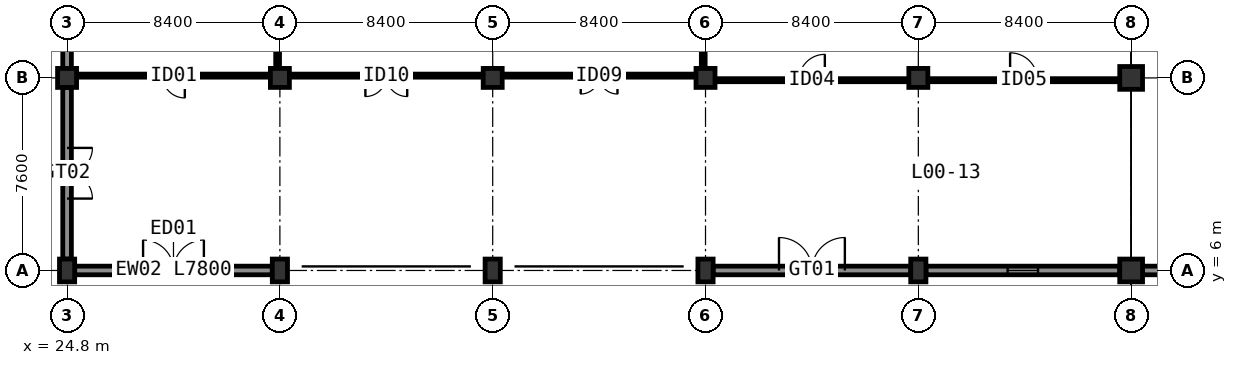
"""IFC4 building model, lengths in metres.
Left out: names, types, materials, properties, quantities, classifications, styles, units other than length and angle.
Written with IfcOpenShell. Run it as: python <this file> out.ifc"""

import sys

from ifc_helpers import new_model, si_unit, direction, frame, frame_2d, origin, origin_2d, place, context, subcontext, project, spatial, rectangle, extrude, element, fill, save


model = new_model("IFC4")
c1 = context("Model", 3, precision=1e-05, world=origin(), true_north=direction((0.0, 1.0)))
c2 = subcontext(c1, "Body", "Model", "MODEL_VIEW")
j1 = project(units=[si_unit("LENGTHUNIT", "METRE"), si_unit("PLANEANGLEUNIT", "RADIAN")], contexts=[c1])
p1 = place(None, origin())
s1 = spatial("IfcSite", under=j1, at=p1, CompositionType="ELEMENT")
p2 = place(p1, origin())
s2 = spatial("IfcBuilding", under=s1, at=p2, CompositionType="ELEMENT")
p3 = place(p2, origin())
s3 = spatial("IfcBuildingStorey", under=s2, at=p3, CompositionType="ELEMENT", Elevation=0.0)
for number, where, z_axis, x_axis in (
    (1, (24.8, 6.0, 0.0), (0.0, 0.0, 1.0), (1.0, 0.0, 0.0)),
    (2, (33.2, 6.0, 0.0), (0.0, 0.0, 1.0), (1.0, 0.0, 0.0)),
    (3, (41.6, 6.0, 0.0), (0.0, 0.0, 1.0), (1.0, 0.0, 0.0)),
    (4, (50.0, 6.0, 0.0), (0.0, 0.0, 1.0), (1.0, 0.0, 0.0)),
    (5, (58.4, 6.0, 0.0), (0.0, 0.0, 1.0), (1.0, 0.0, 0.0)),
):
    element("IfcColumn", number, at=place(p3, frame(where, z_axis=z_axis, x_axis=x_axis)), inside=s3, PredefinedType="PILASTER", context=c2, shape_type="SweptSolid", body=[
        extrude(rectangle(XDim=0.6, YDim=0.9, at=origin_2d()), origin(), (0.0, 0.0, 1.0), 4.8),
    ])
p4 = place(p3, frame((66.8, 6.0, 0.0), z_axis=(0.0, 0.0, 1.0), x_axis=(1.0, 0.0, 0.0)))
e6 = element("IfcColumn", 6, at=p4, inside=s3, PredefinedType="COLUMN", context=c2, shape_type="SweptSolid", body=[
    extrude(rectangle(XDim=0.9, YDim=0.9, at=origin_2d()), origin(), (0.0, 0.0, 1.0), 4.8),
])
for number, where, z_axis, x_axis in (
    (7, (24.8, 13.6, 0.0), (0.0, 0.0, 1.0), (1.0, 0.0, 0.0)),
    (8, (33.2, 13.6, 0.0), (0.0, 0.0, 1.0), (1.0, 0.0, 0.0)),
    (9, (41.6, 13.6, 0.0), (0.0, 0.0, 1.0), (1.0, 0.0, 0.0)),
    (10, (50.0, 13.6, 0.0), (0.0, 0.0, 1.0), (1.0, 0.0, 0.0)),
    (11, (58.4, 13.6, 0.0), (0.0, 0.0, 1.0), (1.0, 0.0, 0.0)),
):
    element("IfcColumn", number, at=place(p3, frame(where, z_axis=z_axis, x_axis=x_axis)), inside=s3, PredefinedType="COLUMN", context=c2, shape_type="SweptSolid", body=[
        extrude(rectangle(XDim=0.75, YDim=0.75, at=origin_2d()), origin(), (0.0, 0.0, 1.0), 4.8),
    ])
p5 = place(p3, frame((66.8, 13.6, 0.0), z_axis=(0.0, 0.0, 1.0), x_axis=(1.0, 0.0, 0.0)))
e12 = element("IfcColumn", 12, at=p5, inside=s3, PredefinedType="COLUMN", context=c2, shape_type="SweptSolid", body=[
    extrude(rectangle(XDim=0.9, YDim=0.9, at=origin_2d()), origin(), (0.0, 0.0, 1.0), 4.8),
])
p6 = place(p3, frame((25.1, 6.0, 0.0), z_axis=(0.0, 0.0, 1.0), x_axis=(1.0, 0.0, 0.0)))
e13 = element("IfcWall", 13, at=p6, inside=s3, PredefinedType="SOLIDWALL", context=c2, shape_type="SweptSolid", body=[
    extrude(rectangle(XDim=7.8, YDim=0.34, at=frame_2d((3.9, 0.0))), origin(), (0.0, 0.0, 1.0), 2.947),
])
p7 = place(p6, frame((2.7, 0.0, 0.0)))
e14 = element("IfcOpeningElement", 14, at=p7, cuts=e13, PredefinedType="OPENING", context=c2, shape_type="SweptSolid", body=[
    extrude(rectangle(XDim=2.4, YDim=2.4, at=frame_2d((1.2, 1.2))), frame((0.0, 0.18, 0.0), z_axis=(0.0, -1.0, 0.0), x_axis=(1.0, 0.0, 0.0)), (0.0, 0.0, 1.0), 0.36),
])
p8 = place(p3, frame((50.3, 6.0, 0.0), z_axis=(0.0, 0.0, 1.0), x_axis=(1.0, 0.0, 0.0)))
e15 = element("IfcWall", 15, at=p8, inside=s3, PredefinedType="SOLIDWALL", context=c2, shape_type="SweptSolid", body=[
    extrude(rectangle(XDim=7.8, YDim=0.34, at=frame_2d((3.9, 0.0))), origin(), (0.0, 0.0, 1.0), 2.947),
])
p9 = place(p8, frame((2.6, 0.0, 0.0)))
e16 = element("IfcOpeningElement", 16, at=p9, cuts=e15, PredefinedType="OPENING", context=c2, shape_type="SweptSolid", body=[
    extrude(rectangle(XDim=2.6, YDim=2.2, at=frame_2d((1.3, 1.1))), frame((0.0, 0.18, 0.0), z_axis=(0.0, -1.0, 0.0), x_axis=(1.0, 0.0, 0.0)), (0.0, 0.0, 1.0), 0.36),
])
p10 = place(p3, frame((58.7, 6.0, 0.0), z_axis=(0.0, 0.0, 1.0), x_axis=(1.0, 0.0, 0.0)))
e17 = element("IfcWall", 17, at=p10, inside=s3, PredefinedType="SOLIDWALL", context=c2, shape_type="SweptSolid", body=[
    extrude(rectangle(XDim=7.65, YDim=0.34, at=frame_2d((3.825, 0.0))), origin(), (0.0, 0.0, 1.0), 4.047),
])
p11 = place(p10, frame((3.225, 0.0, 0.95)))
e18 = element("IfcOpeningElement", 18, at=p11, cuts=e17, PredefinedType="OPENING", context=c2, shape_type="SweptSolid", body=[
    extrude(rectangle(XDim=1.2, YDim=1.5, at=frame_2d((0.6, 0.75))), frame((0.0, 0.18, 0.0), z_axis=(0.0, -1.0, 0.0), x_axis=(1.0, 0.0, 0.0)), (0.0, 0.0, 1.0), 0.36),
])
p12 = place(p3, frame((67.25, 6.0, 0.0), z_axis=(0.0, 0.0, 1.0), x_axis=(1.0, 0.0, 0.0)))
e19 = element("IfcWall", 19, at=p12, inside=s3, PredefinedType="SOLIDWALL", context=c2, shape_type="SweptSolid", body=[
    extrude(rectangle(XDim=7.95, YDim=0.34, at=frame_2d((3.975, 0.0))), origin(), (0.0, 0.0, 1.0), 4.5),
])
p13 = place(p12, frame((2.875, 0.0, 0.0)))
e20 = element("IfcOpeningElement", 20, at=p13, cuts=e19, PredefinedType="OPENING", context=c2, shape_type="SweptSolid", body=[
    extrude(rectangle(XDim=2.2, YDim=2.4, at=frame_2d((1.1, 1.2))), frame((0.0, 0.18, 0.0), z_axis=(0.0, -1.0, 0.0), x_axis=(1.0, 0.0, 0.0)), (0.0, 0.0, 1.0), 0.36),
])
p14 = place(p3, frame((24.8, 20.825, 0.0), z_axis=(0.0, 0.0, 1.0), x_axis=(0.0, -1.0, 0.0)))
e21 = element("IfcWall", 21, at=p14, inside=s3, PredefinedType="SOLIDWALL", context=c2, shape_type="SweptSolid", body=[
    extrude(rectangle(XDim=6.85, YDim=0.34, at=frame_2d((3.425, 0.0))), origin(), (0.0, 0.0, 1.0), 4.5),
])
p15 = place(p14, frame((2.225, 0.0, 0.0)))
e22 = element("IfcOpeningElement", 22, at=p15, cuts=e21, PredefinedType="OPENING", context=c2, shape_type="SweptSolid", body=[
    extrude(rectangle(XDim=2.4, YDim=2.4, at=frame_2d((1.2, 1.2))), frame((0.0, 0.18, 0.0), z_axis=(0.0, -1.0, 0.0), x_axis=(1.0, 0.0, 0.0)), (0.0, 0.0, 1.0), 0.36),
])
p16 = place(p3, frame((24.8, 13.225, 0.0), z_axis=(0.0, 0.0, 1.0), x_axis=(0.0, -1.0, 0.0)))
e23 = element("IfcWall", 23, at=p16, inside=s3, PredefinedType="SOLIDWALL", context=c2, shape_type="SweptSolid", body=[
    extrude(rectangle(XDim=6.775, YDim=0.34, at=frame_2d((3.388, 0.0))), origin(), (0.0, 0.0, 1.0), 4.5),
])
p17 = place(p16, frame((2.387, 0.0, 0.0)))
e24 = element("IfcOpeningElement", 24, at=p17, cuts=e23, PredefinedType="OPENING", context=c2, shape_type="SweptSolid", body=[
    extrude(rectangle(XDim=2.0, YDim=2.1, at=frame_2d((1.0, 1.05))), frame((0.0, 0.18, 0.0), z_axis=(0.0, -1.0, 0.0), x_axis=(1.0, 0.0, 0.0)), (0.0, 0.0, 1.0), 0.36),
])
p18 = place(p3, frame((33.11, 20.735, 0.0), z_axis=(0.0, 0.0, 1.0), x_axis=(0.0, -1.0, 0.0)))
e25 = element("IfcWall", 25, at=p18, inside=s3, PredefinedType="PARTITIONING", context=c2, shape_type="SweptSolid", body=[
    extrude(rectangle(XDim=6.67, YDim=0.15, at=frame_2d((3.335, 0.0))), origin(), (0.0, 0.0, 1.0), 3.81),
])
p19 = place(p18, frame((2.46, 0.0, 0.0)))
e26 = element("IfcOpeningElement", 26, at=p19, cuts=e25, PredefinedType="OPENING", context=c2, shape_type="SweptSolid", body=[
    extrude(rectangle(XDim=1.75, YDim=2.22, at=frame_2d((0.875, 1.11))), frame((0.0, 0.085, 0.0), z_axis=(0.0, -1.0, 0.0), x_axis=(1.0, 0.0, 0.0)), (0.0, 0.0, 1.0), 0.17),
])
p20 = place(p3, frame((32.735, 13.69, 0.0), z_axis=(0.0, 0.0, 1.0), x_axis=(-1.0, 0.0, 0.0)))
e27 = element("IfcWall", 27, at=p20, inside=s3, PredefinedType="PARTITIONING", context=c2, shape_type="SweptSolid", body=[
    extrude(rectangle(XDim=7.455, YDim=0.12, at=frame_2d((3.728, 0.0))), origin(), (0.0, 0.0, 1.0), 4.5),
])
p21 = place(p20, frame((3.288, 0.0, 0.0)))
e28 = element("IfcOpeningElement", 28, at=p21, cuts=e27, PredefinedType="OPENING", context=c2, shape_type="SweptSolid", body=[
    extrude(rectangle(XDim=0.88, YDim=2.08, at=frame_2d((0.44, 1.04))), frame((0.0, 0.07, 0.0), z_axis=(0.0, -1.0, 0.0), x_axis=(1.0, 0.0, 0.0)), (0.0, 0.0, 1.0), 0.14),
])
p22 = place(p3, frame((49.91, 20.735, 0.0), z_axis=(0.0, 0.0, 1.0), x_axis=(0.0, -1.0, 0.0)))
e29 = element("IfcWall", 29, at=p22, inside=s3, PredefinedType="PARTITIONING", context=c2, shape_type="SweptSolid", body=[
    extrude(rectangle(XDim=6.67, YDim=0.15, at=frame_2d((3.335, 0.0))), origin(), (0.0, 0.0, 1.0), 4.5),
])
p23 = place(p22, frame((4.675, 0.0, 0.0)))
e30 = element("IfcOpeningElement", 30, at=p23, cuts=e29, PredefinedType="OPENING", context=c2, shape_type="SweptSolid", body=[
    extrude(rectangle(XDim=0.92, YDim=2.08, at=frame_2d((0.46, 1.04))), frame((0.0, 0.085, 0.0), z_axis=(0.0, -1.0, 0.0), x_axis=(1.0, 0.0, 0.0)), (0.0, 0.0, 1.0), 0.17),
])
p24 = place(p3, frame((50.465, 13.51, 0.0), z_axis=(0.0, 0.0, 1.0), x_axis=(1.0, 0.0, 0.0)))
e31 = element("IfcWall", 31, at=p24, inside=s3, PredefinedType="PARTITIONING", context=c2, shape_type="SweptSolid", body=[
    extrude(rectangle(XDim=7.47, YDim=0.12, at=frame_2d((3.735, 0.0))), origin(), (0.0, 0.0, 1.0), 3.81),
])
p25 = place(p24, frame((3.225, 0.0, 0.0)))
e32 = element("IfcOpeningElement", 32, at=p25, cuts=e31, PredefinedType="OPENING", context=c2, shape_type="SweptSolid", body=[
    extrude(rectangle(XDim=1.02, YDim=2.12, at=frame_2d((0.51, 1.06))), frame((0.0, 0.07, 0.0), z_axis=(0.0, -1.0, 0.0), x_axis=(1.0, 0.0, 0.0)), (0.0, 0.0, 1.0), 0.14),
])
p26 = place(p3, frame((58.865, 13.51, 0.0), z_axis=(0.0, 0.0, 1.0), x_axis=(1.0, 0.0, 0.0)))
e33 = element("IfcWall", 33, at=p26, inside=s3, PredefinedType="PARTITIONING", context=c2, shape_type="SweptSolid", body=[
    extrude(rectangle(XDim=7.395, YDim=0.12, at=frame_2d((3.698, 0.0))), origin(), (0.0, 0.0, 1.0), 3.81),
])
p27 = place(p26, frame((3.157, 0.0, 0.0)))
e34 = element("IfcOpeningElement", 34, at=p27, cuts=e33, PredefinedType="OPENING", context=c2, shape_type="SweptSolid", body=[
    extrude(rectangle(XDim=1.08, YDim=2.12, at=frame_2d((0.54, 1.06))), frame((0.0, 0.07, 0.0), z_axis=(0.0, -1.0, 0.0), x_axis=(1.0, 0.0, 0.0)), (0.0, 0.0, 1.0), 0.14),
])
p28 = place(p3, frame((49.535, 13.69, 0.0), z_axis=(0.0, 0.0, 1.0), x_axis=(-1.0, 0.0, 0.0)))
e35 = element("IfcWall", 35, at=p28, inside=s3, PredefinedType="PARTITIONING", context=c2, shape_type="SweptSolid", body=[
    extrude(rectangle(XDim=7.47, YDim=0.12, at=frame_2d((3.735, 0.0))), origin(), (0.0, 0.0, 1.0), 3.81),
])
p29 = place(p28, frame((3.01, 0.0, 0.0)))
e36 = element("IfcOpeningElement", 36, at=p29, cuts=e35, PredefinedType="OPENING", context=c2, shape_type="SweptSolid", body=[
    extrude(rectangle(XDim=1.45, YDim=2.18, at=frame_2d((0.725, 1.09))), frame((0.0, 0.07, 0.0), z_axis=(0.0, -1.0, 0.0), x_axis=(1.0, 0.0, 0.0)), (0.0, 0.0, 1.0), 0.14),
])
p30 = place(p3, frame((41.135, 13.69, 0.0), z_axis=(0.0, 0.0, 1.0), x_axis=(-1.0, 0.0, 0.0)))
e37 = element("IfcWall", 37, at=p30, inside=s3, PredefinedType="PARTITIONING", context=c2, shape_type="SweptSolid", body=[
    extrude(rectangle(XDim=7.47, YDim=0.12, at=frame_2d((3.735, 0.0))), origin(), (0.0, 0.0, 1.0), 3.81),
])
p31 = place(p30, frame((2.91, 0.0, 0.0)))
e38 = element("IfcOpeningElement", 38, at=p31, cuts=e37, PredefinedType="OPENING", context=c2, shape_type="SweptSolid", body=[
    extrude(rectangle(XDim=1.65, YDim=2.18, at=frame_2d((0.825, 1.09))), frame((0.0, 0.07, 0.0), z_axis=(0.0, -1.0, 0.0), x_axis=(1.0, 0.0, 0.0)), (0.0, 0.0, 1.0), 0.14),
])
p32 = place(p7, frame((2.4, 0.0, 0.0), z_axis=(0.0, 0.0, 1.0), x_axis=(-1.0, 0.0, 0.0)))
e39 = element("IfcDoor", 39, at=p32, inside=s3, OperationType="DOUBLE_DOOR_SINGLE_SWING", PredefinedType="DOOR", context=c2, shape_type="SweptSolid", body=[
    extrude(rectangle(XDim=2.4, YDim=2.4, at=frame_2d((1.2, 1.2))), frame((0.0, 0.025, 0.0), z_axis=(0.0, -1.0, 0.0), x_axis=(1.0, 0.0, 0.0)), (0.0, 0.0, 1.0), 0.05),
])
fill(e14, e39)
p33 = place(p9, frame((2.6, 0.0, 0.0), z_axis=(0.0, 0.0, 1.0), x_axis=(-1.0, 0.0, 0.0)))
e40 = element("IfcDoor", 40, at=p33, inside=s3, OperationType="DOUBLE_DOOR_SINGLE_SWING", PredefinedType="GATE", context=c2, shape_type="SweptSolid", body=[
    extrude(rectangle(XDim=2.6, YDim=2.2, at=frame_2d((1.3, 1.1))), frame((0.0, 0.025, 0.0), z_axis=(0.0, -1.0, 0.0), x_axis=(1.0, 0.0, 0.0)), (0.0, 0.0, 1.0), 0.05),
])
fill(e16, e40)
p34 = place(p11, origin())
e41 = element("IfcWindow", 41, at=p34, inside=s3, PartitioningType="SINGLE_PANEL", PredefinedType="WINDOW", context=c2, shape_type="SweptSolid", body=[
    extrude(rectangle(XDim=1.2, YDim=1.5, at=frame_2d((0.6, 0.75))), frame((0.0, 0.03, 0.0), z_axis=(0.0, -1.0, 0.0), x_axis=(1.0, 0.0, 0.0)), (0.0, 0.0, 1.0), 0.06),
])
fill(e18, e41)
p35 = place(p17, frame((2.0, 0.0, 0.0), z_axis=(0.0, 0.0, 1.0), x_axis=(-1.0, 0.0, 0.0)))
e42 = element("IfcDoor", 42, at=p35, inside=s3, OperationType="DOUBLE_DOOR_SINGLE_SWING", PredefinedType="GATE", context=c2, shape_type="SweptSolid", body=[
    extrude(rectangle(XDim=2.0, YDim=2.1, at=frame_2d((1.0, 1.05))), frame((0.0, 0.025, 0.0), z_axis=(0.0, -1.0, 0.0), x_axis=(1.0, 0.0, 0.0)), (0.0, 0.0, 1.0), 0.05),
])
fill(e24, e42)
p36 = place(p21, origin())
e43 = element("IfcDoor", 43, at=p36, inside=s3, OperationType="SINGLE_SWING_LEFT", PredefinedType="DOOR", context=c2, shape_type="SweptSolid", body=[
    extrude(rectangle(XDim=0.88, YDim=2.08, at=frame_2d((0.44, 1.04))), frame((0.0, 0.025, 0.0), z_axis=(0.0, -1.0, 0.0), x_axis=(1.0, 0.0, 0.0)), (0.0, 0.0, 1.0), 0.05),
])
fill(e28, e43)
p37 = place(p25, origin())
e44 = element("IfcDoor", 44, at=p37, inside=s3, OperationType="SINGLE_SWING_RIGHT", PredefinedType="DOOR", context=c2, shape_type="SweptSolid", body=[
    extrude(rectangle(XDim=1.02, YDim=2.12, at=frame_2d((0.51, 1.06))), frame((0.0, 0.025, 0.0), z_axis=(0.0, -1.0, 0.0), x_axis=(1.0, 0.0, 0.0)), (0.0, 0.0, 1.0), 0.05),
])
fill(e32, e44)
p38 = place(p27, origin())
e45 = element("IfcDoor", 45, at=p38, inside=s3, OperationType="SINGLE_SWING_LEFT", PredefinedType="DOOR", context=c2, shape_type="SweptSolid", body=[
    extrude(rectangle(XDim=1.08, YDim=2.12, at=frame_2d((0.54, 1.06))), frame((0.0, 0.025, 0.0), z_axis=(0.0, -1.0, 0.0), x_axis=(1.0, 0.0, 0.0)), (0.0, 0.0, 1.0), 0.05),
])
fill(e34, e45)
p39 = place(p29, origin())
e46 = element("IfcDoor", 46, at=p39, inside=s3, OperationType="DOUBLE_DOOR_SINGLE_SWING", PredefinedType="DOOR", context=c2, shape_type="SweptSolid", body=[
    extrude(rectangle(XDim=1.45, YDim=2.18, at=frame_2d((0.725, 1.09))), frame((0.0, 0.025, 0.0), z_axis=(0.0, -1.0, 0.0), x_axis=(1.0, 0.0, 0.0)), (0.0, 0.0, 1.0), 0.05),
])
fill(e36, e46)
p40 = place(p31, origin())
e47 = element("IfcDoor", 47, at=p40, inside=s3, OperationType="DOUBLE_DOOR_SINGLE_SWING", PredefinedType="DOOR", context=c2, shape_type="SweptSolid", body=[
    extrude(rectangle(XDim=1.65, YDim=2.18, at=frame_2d((0.825, 1.09))), frame((0.0, 0.025, 0.0), z_axis=(0.0, -1.0, 0.0), x_axis=(1.0, 0.0, 0.0)), (0.0, 0.0, 1.0), 0.05),
])
fill(e38, e47)
save(model, sys.argv[1])
